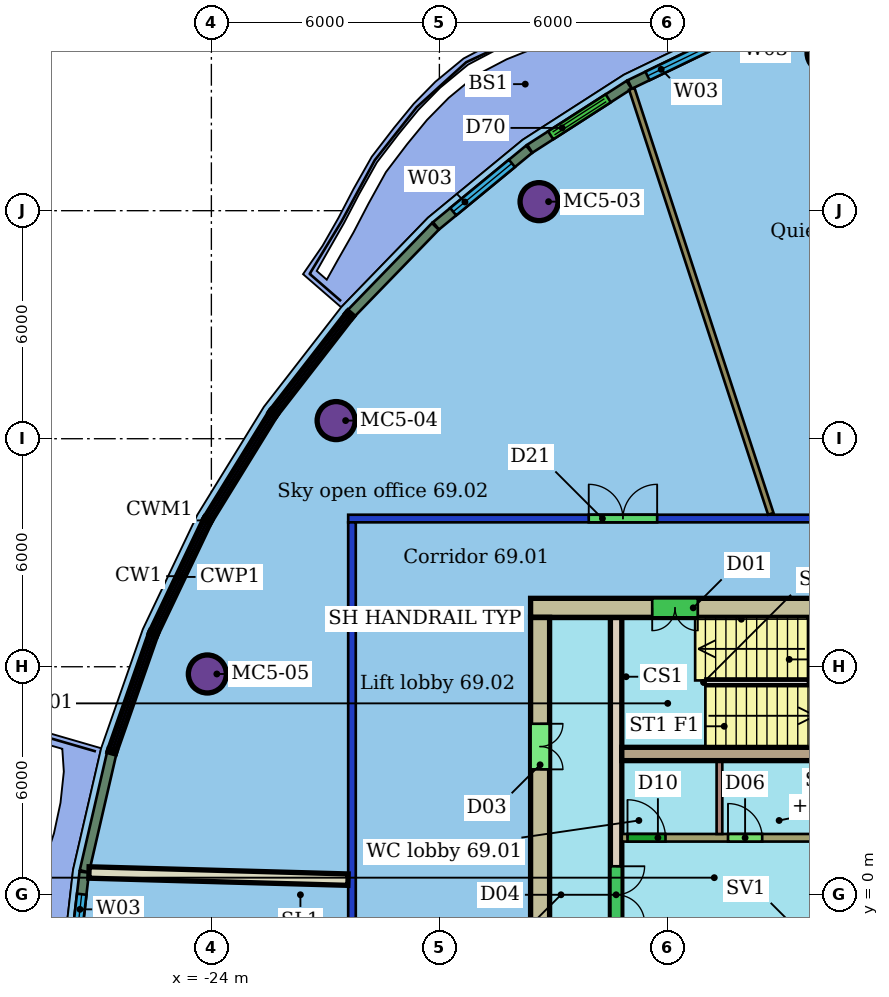
"""IFC4 building model, lengths in metres.
Left out: names, types, materials, properties, quantities, classifications, styles, units other than length and angle.
Written with IfcOpenShell. Run it as: python <this file> out.ifc"""

import sys

from ifc_helpers import new_model, si_unit, direction, frame, frame_2d, origin, origin_2d, place, context, subcontext, project, spatial, rectangle, hollow_circle, extrude, element, fill, save


model = new_model("IFC4")
c1 = context("Model", 3, precision=1e-05, world=origin(), true_north=direction((0.0, 1.0)))
c2 = subcontext(c1, "Body", "Model", "MODEL_VIEW")
j1 = project(units=[si_unit("LENGTHUNIT", "METRE"), si_unit("PLANEANGLEUNIT", "RADIAN")], contexts=[c1])
p1 = place(None, origin())
s1 = spatial("IfcSite", under=j1, at=p1, CompositionType="ELEMENT")
p2 = place(p1, origin())
s2 = spatial("IfcBuilding", under=s1, at=p2, CompositionType="ELEMENT")
p3 = place(p2, frame((0.0, 0.0, 279.3)))
s3 = spatial("IfcBuildingStorey", under=s2, at=p3, CompositionType="ELEMENT", Elevation=279.3)
for number, where, z_axis, x_axis in (
    (1, (-7.825, 22.149, 0.0), (0.0, 0.0, 1.0), (1.0, 0.0, 0.0)),
    (2, (-15.377, 18.238, 0.0), (0.0, 0.0, 1.0), (1.0, 0.0, 0.0)),
    (3, (-20.718, 12.477, 0.0), (0.0, 0.0, 1.0), (1.0, 0.0, 0.0)),
    (4, (-24.106, 5.81, 0.0), (0.0, 0.0, 1.0), (1.0, 0.0, 0.0)),
):
    element("IfcColumn", number, at=place(p3, frame(where, z_axis=z_axis, x_axis=x_axis)), inside=s3, PredefinedType="COLUMN", context=c2, shape_type="SweptSolid", body=[
        extrude(hollow_circle(Radius=0.5, WallThickness=0.04, at=origin_2d()), origin(), (0.0, 0.0, 1.0), 3.45),
    ])
p4 = place(p3, frame((-20.3, -9.8, 0.0), z_axis=(0.0, 0.0, 1.0), x_axis=(0.0, 1.0, 0.0)))
e5 = element("IfcWall", 5, at=p4, inside=s3, PredefinedType="PARTITIONING", context=c2, shape_type="SweptSolid", body=[
    extrude(rectangle(XDim=19.6, YDim=0.2, at=frame_2d((9.8, 0.0))), origin(), (0.0, 0.0, 1.0), 3.1),
])
p5 = place(p4, frame((5.619, 0.0, 0.0)))
e6 = element("IfcOpeningElement", 6, at=p5, cuts=e5, PredefinedType="OPENING", context=c2, shape_type="SweptSolid", body=[
    extrude(rectangle(XDim=1.8, YDim=2.4, at=frame_2d((0.9, 1.2))), frame((0.0, 0.11, 0.0), z_axis=(0.0, -1.0, 0.0), x_axis=(1.0, 0.0, 0.0)), (0.0, 0.0, 1.0), 0.22),
])
p6 = place(p3, frame((-20.4, 9.9, 0.0), z_axis=(0.0, 0.0, 1.0), x_axis=(1.0, 0.0, 0.0)))
e7 = element("IfcWall", 7, at=p6, inside=s3, PredefinedType="PARTITIONING", context=c2, shape_type="SweptSolid", body=[
    extrude(rectangle(XDim=28.8, YDim=0.2, at=frame_2d((14.4, 0.0))), origin(), (0.0, 0.0, 1.0), 3.1),
])
p7 = place(p6, frame((12.542, 0.0, 0.0)))
e8 = element("IfcOpeningElement", 8, at=p7, cuts=e7, PredefinedType="OPENING", context=c2, shape_type="SweptSolid", body=[
    extrude(rectangle(XDim=0.9, YDim=2.1, at=frame_2d((0.45, 1.05))), frame((0.0, 0.11, 0.0), z_axis=(0.0, -1.0, 0.0), x_axis=(1.0, 0.0, 0.0)), (0.0, 0.0, 1.0), 0.22),
])
p8 = place(p6, frame((6.33, 0.0, 0.0)))
e9 = element("IfcOpeningElement", 9, at=p8, cuts=e7, PredefinedType="OPENING", context=c2, shape_type="SweptSolid", body=[
    extrude(rectangle(XDim=1.8, YDim=2.1, at=frame_2d((0.9, 1.05))), frame((0.0, 0.11, 0.0), z_axis=(0.0, -1.0, 0.0), x_axis=(1.0, 0.0, 0.0)), (0.0, 0.0, 1.0), 0.22),
])
p9 = place(p6, frame((23.286, 0.0, 0.0)))
e10 = element("IfcOpeningElement", 10, at=p9, cuts=e7, PredefinedType="OPENING", context=c2, shape_type="SweptSolid", body=[
    extrude(rectangle(XDim=1.5, YDim=2.1, at=frame_2d((0.75, 1.05))), frame((0.0, 0.11, 0.0), z_axis=(0.0, -1.0, 0.0), x_axis=(1.0, 0.0, 0.0)), (0.0, 0.0, 1.0), 0.22),
])
p10 = place(p6, frame((18.892, 0.0, 0.0)))
e11 = element("IfcOpeningElement", 11, at=p10, cuts=e7, PredefinedType="OPENING", context=c2, shape_type="SweptSolid", body=[
    extrude(rectangle(XDim=1.0, YDim=2.1, at=frame_2d((0.5, 1.05))), frame((0.0, 0.11, 0.0), z_axis=(0.0, -1.0, 0.0), x_axis=(1.0, 0.0, 0.0)), (0.0, 0.0, 1.0), 0.22),
])
p11 = place(p3, frame((-12.937, 21.207, 0.0), z_axis=(0.0, 0.0, 1.0), x_axis=(0.310907191513, -0.950440276012, 0.0)))
e12 = element("IfcWall", 12, at=p11, inside=s3, PredefinedType="PARTITIONING", context=c2, shape_type="SweptSolid", body=[
    extrude(rectangle(XDim=11.767, YDim=0.15, at=frame_2d((5.884, 0.0))), origin(), (0.0, 0.0, 1.0), 3.45),
])
p12 = place(p3, frame((-27.221, 0.587, 0.0), z_axis=(0.0, 0.0, 1.0), x_axis=(0.999617973276, -0.027638876665, 0.0)))
e13 = element("IfcWall", 13, at=p12, inside=s3, PredefinedType="PARTITIONING", context=c2, shape_type="SweptSolid", body=[
    extrude(rectangle(XDim=6.819, YDim=0.3, at=frame_2d((3.41, 0.0))), origin(), (0.0, 0.0, 1.0), 3.45),
])
p13 = place(p3, frame((-10.259, 22.637, 0.0), z_axis=(0.0, 0.0, 1.0), x_axis=(-0.900781065891, -0.434273498308, 0.0)))
e14 = element("IfcWall", 14, at=p13, inside=s3, PredefinedType="SOLIDWALL", context=c2, shape_type="SweptSolid", body=[
    extrude(rectangle(XDim=3.03, YDim=0.25, at=frame_2d((1.515, 0.0))), origin(), (0.0, 0.0, 1.0), 3.15),
])
p14 = place(p13, frame((0.515, 0.0, 0.9)))
e15 = element("IfcOpeningElement", 15, at=p14, cuts=e14, PredefinedType="OPENING", context=c2, shape_type="SweptSolid", body=[
    extrude(rectangle(XDim=2.0, YDim=2.1, at=frame_2d((1.0, 1.05))), frame((0.0, 0.135, 0.0), z_axis=(0.0, -1.0, 0.0), x_axis=(1.0, 0.0, 0.0)), (0.0, 0.0, 1.0), 0.27),
])
p15 = place(p3, frame((-13.008, 21.31, 0.0), z_axis=(0.0, 0.0, 1.0), x_axis=(-0.841150380815, -0.540801291469, 0.0)))
e16 = element("IfcWall", 16, at=p15, inside=s3, PredefinedType="SOLIDWALL", context=c2, shape_type="SweptSolid", body=[
    extrude(rectangle(XDim=3.106, YDim=0.25, at=frame_2d((1.553, 0.0))), origin(), (0.0, 0.0, 1.0), 3.15),
])
p16 = place(p15, frame((0.653, 0.0, 0.0)))
e17 = element("IfcOpeningElement", 17, at=p16, cuts=e16, PredefinedType="OPENING", context=c2, shape_type="SweptSolid", body=[
    extrude(rectangle(XDim=1.8, YDim=2.4, at=frame_2d((0.9, 1.2))), frame((0.0, 0.135, 0.0), z_axis=(0.0, -1.0, 0.0), x_axis=(1.0, 0.0, 0.0)), (0.0, 0.0, 1.0), 0.27),
])
p17 = place(p3, frame((-15.639, 19.617, 0.0), z_axis=(0.0, 0.0, 1.0), x_axis=(-0.772343261753, -0.635205388851, 0.0)))
e18 = element("IfcWall", 18, at=p17, inside=s3, PredefinedType="SOLIDWALL", context=c2, shape_type="SweptSolid", body=[
    extrude(rectangle(XDim=3.172, YDim=0.25, at=frame_2d((1.586, 0.0))), origin(), (0.0, 0.0, 1.0), 3.15),
])
p18 = place(p17, frame((0.586, 0.0, 0.9)))
e19 = element("IfcOpeningElement", 19, at=p18, cuts=e18, PredefinedType="OPENING", context=c2, shape_type="SweptSolid", body=[
    extrude(rectangle(XDim=2.0, YDim=2.1, at=frame_2d((1.0, 1.05))), frame((0.0, 0.135, 0.0), z_axis=(0.0, -1.0, 0.0), x_axis=(1.0, 0.0, 0.0)), (0.0, 0.0, 1.0), 0.27),
])
p19 = place(p3, frame((-18.105, 17.587, 0.0), z_axis=(0.0, 0.0, 1.0), x_axis=(-0.695972067976, -0.718068855053, 0.0)))
e20 = element("IfcWall", 20, at=p19, inside=s3, PredefinedType="SOLIDWALL", context=c2, shape_type="SweptSolid", body=[
    extrude(rectangle(XDim=3.182, YDim=0.25, at=frame_2d((1.591, 0.0))), origin(), (0.0, 0.0, 1.0), 3.15),
])
p20 = place(p3, frame((-26.625, 3.719, 0.0), z_axis=(0.0, 0.0, 1.0), x_axis=(-0.225201327467, -0.974312250825, 0.0)))
e21 = element("IfcWall", 21, at=p20, inside=s3, PredefinedType="SOLIDWALL", context=c2, shape_type="SweptSolid", body=[
    extrude(rectangle(XDim=3.182, YDim=0.25, at=frame_2d((1.591, 0.0))), origin(), (0.0, 0.0, 1.0), 3.15),
])
p21 = place(p3, frame((-27.345, 0.597, 0.0), z_axis=(0.0, 0.0, 1.0), x_axis=(-0.114197656454, -0.993458049069, 0.0)))
e22 = element("IfcWall", 22, at=p21, inside=s3, PredefinedType="SOLIDWALL", context=c2, shape_type="SweptSolid", body=[
    extrude(rectangle(XDim=3.173, YDim=0.25, at=frame_2d((1.586, 0.0))), origin(), (0.0, 0.0, 1.0), 3.15),
])
p22 = place(p21, frame((0.586, 0.0, 0.9)))
e23 = element("IfcOpeningElement", 23, at=p22, cuts=e22, PredefinedType="OPENING", context=c2, shape_type="SweptSolid", body=[
    extrude(rectangle(XDim=2.0, YDim=2.1, at=frame_2d((1.0, 1.05))), frame((0.0, 0.135, 0.0), z_axis=(0.0, -1.0, 0.0), x_axis=(1.0, 0.0, 0.0)), (0.0, 0.0, 1.0), 0.27),
])
p23 = place(p3, frame((-6.0, 7.55, 0.0), z_axis=(0.0, 0.0, 1.0), x_axis=(-1.0, 0.0, 0.0)))
e24 = element("IfcWall", 24, at=p23, inside=s3, PredefinedType="SHEAR", context=c2, shape_type="SweptSolid", body=[
    extrude(rectangle(XDim=9.6, YDim=0.5, at=frame_2d((4.8, 0.0))), origin(), (0.0, 0.0, 1.0), 3.3),
])
p24 = place(p23, frame((5.2, 0.0, 0.0)))
e25 = element("IfcOpeningElement", 25, at=p24, cuts=e24, PredefinedType="OPENING", context=c2, shape_type="SweptSolid", body=[
    extrude(rectangle(XDim=1.2, YDim=2.1, at=frame_2d((0.6, 1.05))), frame((0.0, 0.26, 0.0), z_axis=(0.0, -1.0, 0.0), x_axis=(1.0, 0.0, 0.0)), (0.0, 0.0, 1.0), 0.52),
])
p25 = place(p3, frame((-15.35, 7.3, 0.0), z_axis=(0.0, 0.0, 1.0), x_axis=(0.0, -1.0, 0.0)))
e26 = element("IfcWall", 26, at=p25, inside=s3, PredefinedType="SHEAR", context=c2, shape_type="SweptSolid", body=[
    extrude(rectangle(XDim=14.6, YDim=0.5, at=frame_2d((7.3, 0.0))), origin(), (0.0, 0.0, 1.0), 3.3),
])
p26 = place(p25, frame((10.6, 0.0, 0.0)))
e27 = element("IfcOpeningElement", 27, at=p26, cuts=e26, PredefinedType="OPENING", context=c2, shape_type="SweptSolid", body=[
    extrude(rectangle(XDim=1.2, YDim=2.1, at=frame_2d((0.6, 1.05))), frame((0.0, 0.26, 0.0), z_axis=(0.0, -1.0, 0.0), x_axis=(1.0, 0.0, 0.0)), (0.0, 0.0, 1.0), 0.52),
])
p27 = place(p25, frame((2.8, 0.0, 0.0)))
e28 = element("IfcOpeningElement", 28, at=p27, cuts=e26, PredefinedType="OPENING", context=c2, shape_type="SweptSolid", body=[
    extrude(rectangle(XDim=1.2, YDim=2.1, at=frame_2d((0.6, 1.05))), frame((0.0, 0.26, 0.0), z_axis=(0.0, -1.0, 0.0), x_axis=(1.0, 0.0, 0.0)), (0.0, 0.0, 1.0), 0.52),
])
p28 = place(p3, frame((-13.2, 3.705, 0.0), z_axis=(0.0, 0.0, 1.0), x_axis=(1.0, 0.0, 0.0)))
e29 = element("IfcWall", 29, at=p28, inside=s3, PredefinedType="SHEAR", context=c2, shape_type="SweptSolid", body=[
    extrude(rectangle(XDim=7.2, YDim=0.35, at=frame_2d((3.6, 0.0))), origin(), (0.0, 0.0, 1.0), 3.3),
])
p29 = place(p3, frame((-13.35, 7.3, 0.0), z_axis=(0.0, 0.0, 1.0), x_axis=(0.0, -1.0, 0.0)))
e30 = element("IfcWall", 30, at=p29, inside=s3, PredefinedType="SHEAR", context=c2, shape_type="SweptSolid", body=[
    extrude(rectangle(XDim=14.6, YDim=0.3, at=frame_2d((7.3, 0.0))), origin(), (0.0, 0.0, 1.0), 3.3),
])
p30 = place(p29, frame((6.55, 0.0, 0.0)))
e31 = element("IfcOpeningElement", 31, at=p30, cuts=e30, PredefinedType="OPENING", context=c2, shape_type="SweptSolid", body=[
    extrude(rectangle(XDim=1.5, YDim=2.1, at=frame_2d((0.75, 1.05))), frame((0.0, 0.16, 0.0), z_axis=(0.0, -1.0, 0.0), x_axis=(1.0, 0.0, 0.0)), (0.0, 0.0, 1.0), 0.32),
])
p31 = place(p3, frame((-13.2, 1.5, 0.0), z_axis=(0.0, 0.0, 1.0), x_axis=(1.0, 0.0, 0.0)))
e32 = element("IfcWall", 32, at=p31, inside=s3, PredefinedType="SHEAR", context=c2, shape_type="SweptSolid", body=[
    extrude(rectangle(XDim=14.4, YDim=0.2, at=frame_2d((7.2, 0.0))), origin(), (0.0, 0.0, 1.0), 3.3),
])
p32 = place(p31, frame((10.312, 0.0, 0.0)))
e33 = element("IfcOpeningElement", 33, at=p32, cuts=e32, PredefinedType="OPENING", context=c2, shape_type="SweptSolid", body=[
    extrude(rectangle(XDim=1.1, YDim=2.1, at=frame_2d((0.55, 1.05))), frame((0.0, 0.11, 0.0), z_axis=(0.0, -1.0, 0.0), x_axis=(1.0, 0.0, 0.0)), (0.0, 0.0, 1.0), 0.22),
])
p33 = place(p31, frame((12.754, 0.0, 0.0)))
e34 = element("IfcOpeningElement", 34, at=p33, cuts=e32, PredefinedType="OPENING", context=c2, shape_type="SweptSolid", body=[
    extrude(rectangle(XDim=1.1, YDim=2.1, at=frame_2d((0.55, 1.05))), frame((0.0, 0.11, 0.0), z_axis=(0.0, -1.0, 0.0), x_axis=(1.0, 0.0, 0.0)), (0.0, 0.0, 1.0), 0.22),
])
p34 = place(p31, frame((0.15, 0.0, 0.0)))
e35 = element("IfcOpeningElement", 35, at=p34, cuts=e32, PredefinedType="OPENING", context=c2, shape_type="SweptSolid", body=[
    extrude(rectangle(XDim=1.0, YDim=2.1, at=frame_2d((0.5, 1.05))), frame((0.0, 0.11, 0.0), z_axis=(0.0, -1.0, 0.0), x_axis=(1.0, 0.0, 0.0)), (0.0, 0.0, 1.0), 0.22),
])
p35 = place(p31, frame((2.794, 0.0, 0.0)))
e36 = element("IfcOpeningElement", 36, at=p35, cuts=e32, PredefinedType="OPENING", context=c2, shape_type="SweptSolid", body=[
    extrude(rectangle(XDim=0.9, YDim=2.1, at=frame_2d((0.45, 1.05))), frame((0.0, 0.11, 0.0), z_axis=(0.0, -1.0, 0.0), x_axis=(1.0, 0.0, 0.0)), (0.0, 0.0, 1.0), 0.22),
])
p36 = place(p31, frame((8.467, 0.0, 0.0)))
e37 = element("IfcOpeningElement", 37, at=p36, cuts=e32, PredefinedType="OPENING", context=c2, shape_type="SweptSolid", body=[
    extrude(rectangle(XDim=0.9, YDim=2.1, at=frame_2d((0.45, 1.05))), frame((0.0, 0.11, 0.0), z_axis=(0.0, -1.0, 0.0), x_axis=(1.0, 0.0, 0.0)), (0.0, 0.0, 1.0), 0.22),
])
p37 = place(p3, frame((-10.631, 1.6, 0.0), z_axis=(0.0, 0.0, 1.0), x_axis=(0.0, 1.0, 0.0)))
e38 = element("IfcWall", 38, at=p37, inside=s3, PredefinedType="PARTITIONING", context=c2, shape_type="SweptSolid", body=[
    extrude(rectangle(XDim=1.93, YDim=0.15, at=frame_2d((0.965, 0.0))), origin(), (0.0, 0.0, 1.0), 3.3),
])
p38 = place(p8, origin())
e39 = element("IfcDoor", 39, at=p38, inside=s3, OperationType="DOUBLE_DOOR_SINGLE_SWING", PredefinedType="DOOR", context=c2, shape_type="SweptSolid", body=[
    extrude(rectangle(XDim=1.8, YDim=2.1, at=frame_2d((0.9, 1.05))), frame((0.0, 0.025, 0.0), z_axis=(0.0, -1.0, 0.0), x_axis=(1.0, 0.0, 0.0)), (0.0, 0.0, 1.0), 0.05),
])
fill(e9, e39)
p39 = place(p14, origin())
e40 = element("IfcWindow", 40, at=p39, inside=s3, PartitioningType="SINGLE_PANEL", PredefinedType="WINDOW", context=c2, shape_type="SweptSolid", body=[
    extrude(rectangle(XDim=2.0, YDim=2.1, at=frame_2d((1.0, 1.05))), frame((0.0, 0.03, 0.0), z_axis=(0.0, -1.0, 0.0), x_axis=(1.0, 0.0, 0.0)), (0.0, 0.0, 1.0), 0.06),
])
fill(e15, e40)
p40 = place(p16, origin())
e41 = element("IfcDoor", 41, at=p40, inside=s3, OperationType="DOUBLE_DOOR_SLIDING", PredefinedType="DOOR", context=c2, shape_type="SweptSolid", body=[
    extrude(rectangle(XDim=1.8, YDim=2.4, at=frame_2d((0.9, 1.2))), frame((0.0, 0.025, 0.0), z_axis=(0.0, -1.0, 0.0), x_axis=(1.0, 0.0, 0.0)), (0.0, 0.0, 1.0), 0.05),
])
fill(e17, e41)
p41 = place(p18, origin())
e42 = element("IfcWindow", 42, at=p41, inside=s3, PartitioningType="SINGLE_PANEL", PredefinedType="WINDOW", context=c2, shape_type="SweptSolid", body=[
    extrude(rectangle(XDim=2.0, YDim=2.1, at=frame_2d((1.0, 1.05))), frame((0.0, 0.03, 0.0), z_axis=(0.0, -1.0, 0.0), x_axis=(1.0, 0.0, 0.0)), (0.0, 0.0, 1.0), 0.06),
])
fill(e19, e42)
p42 = place(p22, origin())
e43 = element("IfcWindow", 43, at=p42, inside=s3, PartitioningType="SINGLE_PANEL", PredefinedType="WINDOW", context=c2, shape_type="SweptSolid", body=[
    extrude(rectangle(XDim=2.0, YDim=2.1, at=frame_2d((1.0, 1.05))), frame((0.0, 0.03, 0.0), z_axis=(0.0, -1.0, 0.0), x_axis=(1.0, 0.0, 0.0)), (0.0, 0.0, 1.0), 0.06),
])
fill(e23, e43)
p43 = place(p24, origin())
e44 = element("IfcDoor", 44, at=p43, inside=s3, OperationType="DOUBLE_DOOR_SINGLE_SWING", PredefinedType="NOTDEFINED", context=c2, shape_type="SweptSolid", body=[
    extrude(rectangle(XDim=1.2, YDim=2.1, at=frame_2d((0.6, 1.05))), frame((0.0, 0.025, 0.0), z_axis=(0.0, -1.0, 0.0), x_axis=(1.0, 0.0, 0.0)), (0.0, 0.0, 1.0), 0.05),
])
fill(e25, e44)
p44 = place(p27, origin())
e45 = element("IfcDoor", 45, at=p44, inside=s3, OperationType="DOUBLE_DOOR_SINGLE_SWING", PredefinedType="NOTDEFINED", context=c2, shape_type="SweptSolid", body=[
    extrude(rectangle(XDim=1.2, YDim=2.1, at=frame_2d((0.6, 1.05))), frame((0.0, 0.025, 0.0), z_axis=(0.0, -1.0, 0.0), x_axis=(1.0, 0.0, 0.0)), (0.0, 0.0, 1.0), 0.05),
])
fill(e28, e45)
p45 = place(p30, origin())
e46 = element("IfcDoor", 46, at=p45, inside=s3, OperationType="DOUBLE_DOOR_SINGLE_SWING", PredefinedType="NOTDEFINED", context=c2, shape_type="SweptSolid", body=[
    extrude(rectangle(XDim=1.5, YDim=2.1, at=frame_2d((0.75, 1.05))), frame((0.0, 0.025, 0.0), z_axis=(0.0, -1.0, 0.0), x_axis=(1.0, 0.0, 0.0)), (0.0, 0.0, 1.0), 0.05),
])
fill(e31, e46)
p46 = place(p34, origin())
e47 = element("IfcDoor", 47, at=p46, inside=s3, OperationType="SINGLE_SWING_LEFT", PredefinedType="NOTDEFINED", context=c2, shape_type="SweptSolid", body=[
    extrude(rectangle(XDim=1.0, YDim=2.1, at=frame_2d((0.5, 1.05))), frame((0.0, 0.025, 0.0), z_axis=(0.0, -1.0, 0.0), x_axis=(1.0, 0.0, 0.0)), (0.0, 0.0, 1.0), 0.05),
])
fill(e35, e47)
p47 = place(p35, origin())
e48 = element("IfcDoor", 48, at=p47, inside=s3, OperationType="SINGLE_SWING_LEFT", PredefinedType="NOTDEFINED", context=c2, shape_type="SweptSolid", body=[
    extrude(rectangle(XDim=0.9, YDim=2.1, at=frame_2d((0.45, 1.05))), frame((0.0, 0.025, 0.0), z_axis=(0.0, -1.0, 0.0), x_axis=(1.0, 0.0, 0.0)), (0.0, 0.0, 1.0), 0.05),
])
fill(e36, e48)
save(model, sys.argv[1])
